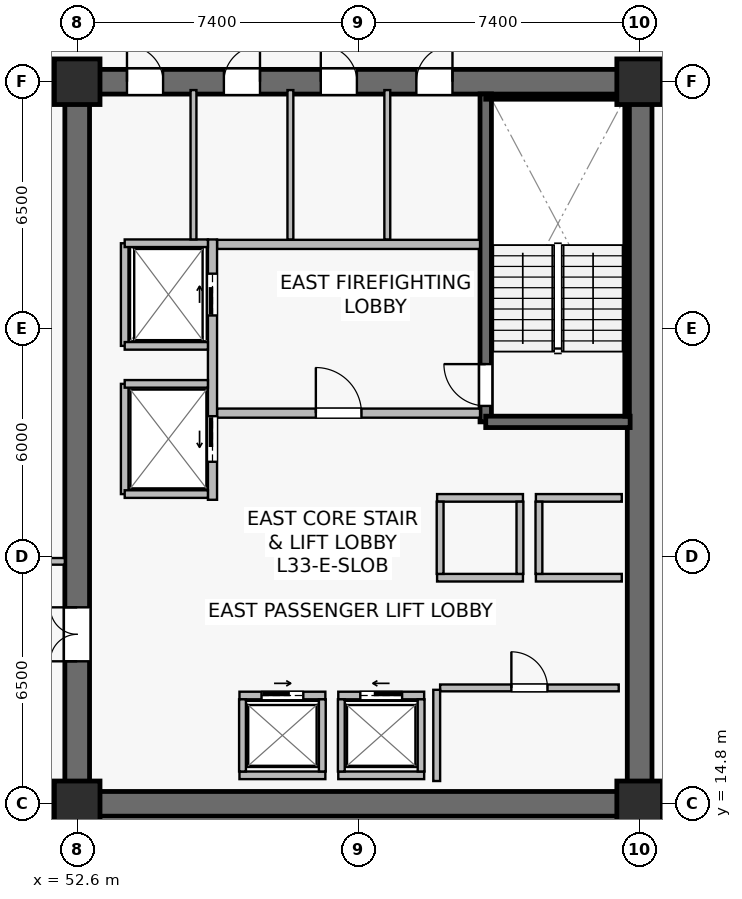
"""IFC4 building model, lengths in metres.
Left out: names, types, materials, properties, quantities, classifications, styles, units other than length and angle.
Written with IfcOpenShell. Run it as: python <this file> out.ifc"""

import sys

from ifc_helpers import new_model, si_unit, direction, frame, frame_2d, origin, origin_2d, place, context, subcontext, project, spatial, rectangle, extrude, source, transform, mapped, element, fill, save


model = new_model("IFC4")
c1 = context("Model", 3, precision=1e-05, world=origin(), true_north=direction((0.0, 1.0)))
c2 = subcontext(c1, "Body", "Model", "MODEL_VIEW")
j1 = project(units=[si_unit("LENGTHUNIT", "METRE"), si_unit("PLANEANGLEUNIT", "RADIAN")], contexts=[c1])
p1 = place(None, origin())
s1 = spatial("IfcSite", under=j1, at=p1, CompositionType="ELEMENT")
p2 = place(p1, origin())
s2 = spatial("IfcBuilding", under=s1, at=p2, CompositionType="ELEMENT")
p3 = place(p2, frame((0.0, 0.0, 137.9)))
s3 = spatial("IfcBuildingStorey", under=s2, at=p3, CompositionType="ELEMENT", Elevation=137.9)
p4 = place(p3, frame((52.275, 14.8, 0.0), z_axis=(0.0, 0.0, 1.0), x_axis=(1.0, 0.0, 0.0)))
e1 = element("IfcWall", 1, at=p4, inside=s3, PredefinedType="SHEAR", context=c2, shape_type="SweptSolid", body=[
    extrude(rectangle(XDim=15.45, YDim=0.65, at=frame_2d((7.725, 0.0))), origin(), (0.0, 0.0, 1.0), 3.79),
])
p5 = place(p3, frame((52.275, 33.8, 0.0), z_axis=(0.0, 0.0, 1.0), x_axis=(1.0, 0.0, 0.0)))
e2 = element("IfcWall", 2, at=p5, inside=s3, PredefinedType="SHEAR", context=c2, shape_type="SweptSolid", body=[
    extrude(rectangle(XDim=15.45, YDim=0.65, at=frame_2d((7.725, 0.0))), origin(), (0.0, 0.0, 1.0), 3.79),
])
p6 = place(p5, frame((9.25, 0.0, 0.0)))
e3 = element("IfcOpeningElement", 3, at=p6, cuts=e2, PredefinedType="OPENING", context=c2, shape_type="SweptSolid", body=[
    extrude(rectangle(XDim=0.95, YDim=2.15, at=frame_2d((0.475, 1.075))), frame((0.0, 0.335, 0.0), z_axis=(0.0, -1.0, 0.0), x_axis=(1.0, 0.0, 0.0)), (0.0, 0.0, 1.0), 0.67),
])
p7 = place(p5, frame((6.735, 0.0, 0.0)))
e4 = element("IfcOpeningElement", 4, at=p7, cuts=e2, PredefinedType="OPENING", context=c2, shape_type="SweptSolid", body=[
    extrude(rectangle(XDim=0.95, YDim=2.15, at=frame_2d((0.475, 1.075))), frame((0.0, 0.335, 0.0), z_axis=(0.0, -1.0, 0.0), x_axis=(1.0, 0.0, 0.0)), (0.0, 0.0, 1.0), 0.67),
])
p8 = place(p5, frame((4.185, 0.0, 0.0)))
e5 = element("IfcOpeningElement", 5, at=p8, cuts=e2, PredefinedType="OPENING", context=c2, shape_type="SweptSolid", body=[
    extrude(rectangle(XDim=0.95, YDim=2.15, at=frame_2d((0.475, 1.075))), frame((0.0, 0.335, 0.0), z_axis=(0.0, -1.0, 0.0), x_axis=(1.0, 0.0, 0.0)), (0.0, 0.0, 1.0), 0.67),
])
p9 = place(p5, frame((1.635, 0.0, 0.0)))
e6 = element("IfcOpeningElement", 6, at=p9, cuts=e2, PredefinedType="OPENING", context=c2, shape_type="SweptSolid", body=[
    extrude(rectangle(XDim=0.95, YDim=2.15, at=frame_2d((0.475, 1.075))), frame((0.0, 0.335, 0.0), z_axis=(0.0, -1.0, 0.0), x_axis=(1.0, 0.0, 0.0)), (0.0, 0.0, 1.0), 0.67),
])
p10 = place(p3, frame((52.6, 15.125, 0.0), z_axis=(0.0, 0.0, 1.0), x_axis=(0.0, 1.0, 0.0)))
e7 = element("IfcWall", 7, at=p10, inside=s3, PredefinedType="SHEAR", context=c2, shape_type="SweptSolid", body=[
    extrude(rectangle(XDim=18.35, YDim=0.65, at=frame_2d((9.175, 0.0))), origin(), (0.0, 0.0, 1.0), 3.79),
])
p11 = place(p10, frame((3.425, 0.0, 0.0)))
e8 = element("IfcOpeningElement", 8, at=p11, cuts=e7, PredefinedType="OPENING", context=c2, shape_type="SweptSolid", body=[
    extrude(rectangle(XDim=1.42, YDim=2.2, at=frame_2d((0.71, 1.1))), frame((0.0, 0.335, 0.0), z_axis=(0.0, -1.0, 0.0), x_axis=(1.0, 0.0, 0.0)), (0.0, 0.0, 1.0), 0.67),
])
p12 = place(p3, frame((67.4, 15.125, 0.0), z_axis=(0.0, 0.0, 1.0), x_axis=(0.0, 1.0, 0.0)))
e9 = element("IfcWall", 9, at=p12, inside=s3, PredefinedType="SHEAR", context=c2, shape_type="SweptSolid", body=[
    extrude(rectangle(XDim=18.35, YDim=0.65, at=frame_2d((9.175, 0.0))), origin(), (0.0, 0.0, 1.0), 3.79),
])
p13 = place(p3, frame((63.35, 24.85, 0.0), z_axis=(0.0, 0.0, 1.0), x_axis=(0.0, 1.0, 0.0)))
e10 = element("IfcWall", 10, at=p13, inside=s3, PredefinedType="SHEAR", context=c2, shape_type="SweptSolid", body=[
    extrude(rectangle(XDim=8.63, YDim=0.3, at=frame_2d((4.315, 0.0))), origin(), (0.0, 0.0, 1.0), 3.79),
])
p14 = place(p13, frame((0.42, 0.0, 0.0)))
e11 = element("IfcOpeningElement", 11, at=p14, cuts=e10, PredefinedType="OPENING", context=c2, shape_type="SweptSolid", body=[
    extrude(rectangle(XDim=1.1, YDim=2.15, at=frame_2d((0.55, 1.075))), frame((0.0, 0.16, 0.0), z_axis=(0.0, -1.0, 0.0), x_axis=(1.0, 0.0, 0.0)), (0.0, 0.0, 1.0), 0.32),
])
p15 = place(p3, frame((63.35, 24.85, 0.0), z_axis=(0.0, 0.0, 1.0), x_axis=(1.0, 0.0, 0.0)))
e12 = element("IfcWall", 12, at=p15, inside=s3, PredefinedType="SHEAR", context=c2, shape_type="SweptSolid", body=[
    extrude(rectangle(XDim=3.8, YDim=0.3, at=frame_2d((1.9, 0.0))), origin(), (0.0, 0.0, 1.0), 3.79),
])
p16 = place(p3, frame((63.35, 33.4, 0.0), z_axis=(0.0, 0.0, 1.0), x_axis=(1.0, 0.0, 0.0)))
e13 = element("IfcWall", 13, at=p16, inside=s3, PredefinedType="SOLIDWALL", context=c2, shape_type="SweptSolid", body=[
    extrude(rectangle(XDim=3.72, YDim=0.12, at=frame_2d((1.86, 0.0))), origin(), (0.0, 0.0, 1.0), 3.79),
])
p17 = place(p3, frame((67.07, 25.0, 0.0), z_axis=(0.0, 0.0, 1.0), x_axis=(0.0, 1.0, 0.0)))
e14 = element("IfcWall", 14, at=p17, inside=s3, PredefinedType="SOLIDWALL", context=c2, shape_type="SweptSolid", body=[
    extrude(rectangle(XDim=8.32, YDim=0.12, at=frame_2d((4.16, 0.0))), origin(), (0.0, 0.0, 1.0), 3.79),
])
m1 = source(origin(), c2, "Body", "SweptSolid", [
    extrude(rectangle(XDim=1.2, YDim=1.2, at=origin_2d()), origin(), (0.0, 0.0, 1.0), 4.1),
])
for number, where, z_axis, x_axis in (
    (15, (52.6, 14.8, 0.0), (0.0, 0.0, 1.0), (1.0, 0.0, 0.0)),
    (16, (67.4, 14.8, 0.0), (0.0, 0.0, 1.0), (1.0, 0.0, 0.0)),
    (17, (52.6, 33.8, 0.0), (0.0, 0.0, 1.0), (1.0, 0.0, 0.0)),
    (18, (67.4, 33.8, 0.0), (0.0, 0.0, 1.0), (1.0, 0.0, 0.0)),
):
    element("IfcColumn", number, at=place(p3, frame(where, z_axis=z_axis, x_axis=x_axis)), inside=s3, PredefinedType="COLUMN", context=c2, shape_type="MappedRepresentation", body=[
        mapped(m1, transform((0.0, 0.0, 0.0), scale=1.0)),
    ])
p18 = place(p3, frame((56.28, 25.08, 0.0), z_axis=(0.0, 0.0, 1.0), x_axis=(1.0, 0.0, 0.0)))
e19 = element("IfcWall", 19, at=p18, inside=s3, PredefinedType="SOLIDWALL", context=c2, shape_type="SweptSolid", body=[
    extrude(rectangle(XDim=6.92, YDim=0.24, at=frame_2d((3.46, 0.0))), origin(), (0.0, 0.0, 1.0), 3.125),
])
p19 = place(p18, frame((2.6, 0.0, 0.0)))
e20 = element("IfcOpeningElement", 20, at=p19, cuts=e19, PredefinedType="OPENING", context=c2, shape_type="SweptSolid", body=[
    extrude(rectangle(XDim=1.2, YDim=2.16, at=frame_2d((0.6, 1.08))), frame((0.0, 0.13, 0.0), z_axis=(0.0, -1.0, 0.0), x_axis=(1.0, 0.0, 0.0)), (0.0, 0.0, 1.0), 0.26),
])
p20 = place(p3, frame((56.28, 29.52, 0.0), z_axis=(0.0, 0.0, 1.0), x_axis=(1.0, 0.0, 0.0)))
e21 = element("IfcWall", 21, at=p20, inside=s3, PredefinedType="SOLIDWALL", context=c2, shape_type="SweptSolid", body=[
    extrude(rectangle(XDim=6.92, YDim=0.24, at=frame_2d((3.46, 0.0))), origin(), (0.0, 0.0, 1.0), 3.125),
])
p21 = place(p3, frame((56.16, 22.8, 0.0), z_axis=(0.0, 0.0, 1.0), x_axis=(0.0, 1.0, 0.0)))
e22 = element("IfcWall", 22, at=p21, inside=s3, PredefinedType="SOLIDWALL", context=c2, shape_type="SweptSolid", body=[
    extrude(rectangle(XDim=6.85, YDim=0.24, at=frame_2d((3.425, 0.0))), origin(), (0.0, 0.0, 1.0), 2.875),
])
p22 = place(p21, frame((4.85, 0.0, 0.0)))
e23 = element("IfcOpeningElement", 23, at=p22, cuts=e22, PredefinedType="OPENING", context=c2, shape_type="SweptSolid", body=[
    extrude(rectangle(XDim=1.1, YDim=2.22, at=frame_2d((0.55, 1.11))), frame((0.0, 0.13, 0.0), z_axis=(0.0, -1.0, 0.0), x_axis=(1.0, 0.0, 0.0)), (0.0, 0.0, 1.0), 0.26),
])
p23 = place(p21, frame((1.0, 0.0, 0.0)))
e24 = element("IfcOpeningElement", 24, at=p23, cuts=e22, PredefinedType="OPENING", context=c2, shape_type="SweptSolid", body=[
    extrude(rectangle(XDim=1.2, YDim=2.22, at=frame_2d((0.6, 1.11))), frame((0.0, 0.13, 0.0), z_axis=(0.0, -1.0, 0.0), x_axis=(1.0, 0.0, 0.0)), (0.0, 0.0, 1.0), 0.26),
])
p24 = place(p3, frame((59.47, 17.65, 0.0), z_axis=(0.0, 0.0, 1.0), x_axis=(1.0, 0.0, 0.0)))
e25 = element("IfcWall", 25, at=p24, inside=s3, PredefinedType="SOLIDWALL", context=c2, shape_type="SweptSolid", body=[
    extrude(rectangle(XDim=2.26, YDim=0.2, at=frame_2d((1.13, 0.0))), origin(), (0.0, 0.0, 1.0), 3.125),
])
p25 = place(p24, frame((0.58, 0.0, 0.0)))
e26 = element("IfcOpeningElement", 26, at=p25, cuts=e25, PredefinedType="OPENING", context=c2, shape_type="SweptSolid", body=[
    extrude(rectangle(XDim=1.1, YDim=2.22, at=frame_2d((0.55, 1.11))), frame((0.0, 0.11, 0.0), z_axis=(0.0, -1.0, 0.0), x_axis=(1.0, 0.0, 0.0)), (0.0, 0.0, 1.0), 0.22),
])
p26 = place(p3, frame((59.47, 15.55, 0.0), z_axis=(0.0, 0.0, 1.0), x_axis=(1.0, 0.0, 0.0)))
e27 = element("IfcWall", 27, at=p26, inside=s3, PredefinedType="SOLIDWALL", context=c2, shape_type="SweptSolid", body=[
    extrude(rectangle(XDim=2.26, YDim=0.2, at=frame_2d((1.13, 0.0))), origin(), (0.0, 0.0, 1.0), 3.125),
])
for number, where, z_axis, x_axis in (
    (28, (59.55, 15.65, 0.0), (0.0, 0.0, 1.0), (0.0, 1.0, 0.0)),
    (29, (61.65, 15.65, 0.0), (0.0, 0.0, 1.0), (0.0, 1.0, 0.0)),
):
    element("IfcWall", number, at=place(p3, frame(where, z_axis=z_axis, x_axis=x_axis)), inside=s3, PredefinedType="SOLIDWALL", context=c2, shape_type="SweptSolid", body=[
        extrude(rectangle(XDim=1.9, YDim=0.18, at=frame_2d((0.95, 0.0))), origin(), (0.0, 0.0, 1.0), 3.79),
    ])
p27 = place(p3, frame((56.87, 17.65, 0.0), z_axis=(0.0, 0.0, 1.0), x_axis=(1.0, 0.0, 0.0)))
e30 = element("IfcWall", 30, at=p27, inside=s3, PredefinedType="SOLIDWALL", context=c2, shape_type="SweptSolid", body=[
    extrude(rectangle(XDim=2.26, YDim=0.2, at=frame_2d((1.13, 0.0))), origin(), (0.0, 0.0, 1.0), 3.79),
])
p28 = place(p27, frame((0.58, 0.0, 0.0)))
e31 = element("IfcOpeningElement", 31, at=p28, cuts=e30, PredefinedType="OPENING", context=c2, shape_type="SweptSolid", body=[
    extrude(rectangle(XDim=1.1, YDim=2.22, at=frame_2d((0.55, 1.11))), frame((0.0, 0.11, 0.0), z_axis=(0.0, -1.0, 0.0), x_axis=(1.0, 0.0, 0.0)), (0.0, 0.0, 1.0), 0.22),
])
p29 = place(p3, frame((56.87, 15.55, 0.0), z_axis=(0.0, 0.0, 1.0), x_axis=(1.0, 0.0, 0.0)))
e32 = element("IfcWall", 32, at=p29, inside=s3, PredefinedType="SOLIDWALL", context=c2, shape_type="SweptSolid", body=[
    extrude(rectangle(XDim=2.26, YDim=0.2, at=frame_2d((1.13, 0.0))), origin(), (0.0, 0.0, 1.0), 3.79),
])
for number, where, z_axis, x_axis in (
    (33, (56.95, 15.65, 0.0), (0.0, 0.0, 1.0), (0.0, 1.0, 0.0)),
    (34, (59.05, 15.65, 0.0), (0.0, 0.0, 1.0), (0.0, 1.0, 0.0)),
):
    element("IfcWall", number, at=place(p3, frame(where, z_axis=z_axis, x_axis=x_axis)), inside=s3, PredefinedType="SOLIDWALL", context=c2, shape_type="SweptSolid", body=[
        extrude(rectangle(XDim=1.9, YDim=0.18, at=frame_2d((0.95, 0.0))), origin(), (0.0, 0.0, 1.0), 3.79),
    ])
for number, where, z_axis, x_axis in (
    (35, (64.67, 20.75, 0.0), (0.0, 0.0, 1.0), (1.0, 0.0, 0.0)),
    (36, (64.67, 22.85, 0.0), (0.0, 0.0, 1.0), (1.0, 0.0, 0.0)),
):
    element("IfcWall", number, at=place(p3, frame(where, z_axis=z_axis, x_axis=x_axis)), inside=s3, PredefinedType="SOLIDWALL", context=c2, shape_type="SweptSolid", body=[
        extrude(rectangle(XDim=2.26, YDim=0.2, at=frame_2d((1.13, 0.0))), origin(), (0.0, 0.0, 1.0), 3.79),
    ])
p30 = place(p3, frame((64.75, 20.85, 0.0), z_axis=(0.0, 0.0, 1.0), x_axis=(0.0, 1.0, 0.0)))
e37 = element("IfcWall", 37, at=p30, inside=s3, PredefinedType="SOLIDWALL", context=c2, shape_type="SweptSolid", body=[
    extrude(rectangle(XDim=1.9, YDim=0.18, at=frame_2d((0.95, 0.0))), origin(), (0.0, 0.0, 1.0), 3.79),
])
for number, where, z_axis, x_axis in (
    (38, (62.07, 20.75, 0.0), (0.0, 0.0, 1.0), (1.0, 0.0, 0.0)),
    (39, (62.07, 22.85, 0.0), (0.0, 0.0, 1.0), (1.0, 0.0, 0.0)),
):
    element("IfcWall", number, at=place(p3, frame(where, z_axis=z_axis, x_axis=x_axis)), inside=s3, PredefinedType="SOLIDWALL", context=c2, shape_type="SweptSolid", body=[
        extrude(rectangle(XDim=2.26, YDim=0.2, at=frame_2d((1.13, 0.0))), origin(), (0.0, 0.0, 1.0), 3.79),
    ])
for number, where, z_axis, x_axis in (
    (40, (62.15, 20.85, 0.0), (0.0, 0.0, 1.0), (0.0, 1.0, 0.0)),
    (41, (64.25, 20.85, 0.0), (0.0, 0.0, 1.0), (0.0, 1.0, 0.0)),
):
    element("IfcWall", number, at=place(p3, frame(where, z_axis=z_axis, x_axis=x_axis)), inside=s3, PredefinedType="SOLIDWALL", context=c2, shape_type="SweptSolid", body=[
        extrude(rectangle(XDim=1.9, YDim=0.18, at=frame_2d((0.95, 0.0))), origin(), (0.0, 0.0, 1.0), 3.79),
    ])
p31 = place(p3, frame((53.85, 26.85, 0.0), z_axis=(0.0, 0.0, 1.0), x_axis=(0.0, 1.0, 0.0)))
e42 = element("IfcWall", 42, at=p31, inside=s3, PredefinedType="SOLIDWALL", context=c2, shape_type="SweptSolid", body=[
    extrude(rectangle(XDim=2.7, YDim=0.2, at=frame_2d((1.35, 0.0))), origin(), (0.0, 0.0, 1.0), 3.79),
])
p32 = place(p3, frame((53.85, 29.55, 0.0), z_axis=(0.0, 0.0, 1.0), x_axis=(1.0, 0.0, 0.0)))
e43 = element("IfcWall", 43, at=p32, inside=s3, PredefinedType="SOLIDWALL", context=c2, shape_type="SweptSolid", body=[
    extrude(rectangle(XDim=2.19, YDim=0.2, at=frame_2d((1.095, 0.0))), origin(), (0.0, 0.0, 1.0), 3.79),
])
p33 = place(p3, frame((53.85, 26.85, 0.0), z_axis=(0.0, 0.0, 1.0), x_axis=(1.0, 0.0, 0.0)))
e44 = element("IfcWall", 44, at=p33, inside=s3, PredefinedType="SOLIDWALL", context=c2, shape_type="SweptSolid", body=[
    extrude(rectangle(XDim=2.19, YDim=0.2, at=frame_2d((1.095, 0.0))), origin(), (0.0, 0.0, 1.0), 3.187),
])
p34 = place(p3, frame((53.85, 22.95, 0.0), z_axis=(0.0, 0.0, 1.0), x_axis=(0.0, 1.0, 0.0)))
e45 = element("IfcWall", 45, at=p34, inside=s3, PredefinedType="SOLIDWALL", context=c2, shape_type="SweptSolid", body=[
    extrude(rectangle(XDim=2.9, YDim=0.2, at=frame_2d((1.45, 0.0))), origin(), (0.0, 0.0, 1.0), 2.875),
])
for number, where, z_axis, x_axis in (
    (46, (53.85, 25.85, 0.0), (0.0, 0.0, 1.0), (1.0, 0.0, 0.0)),
    (47, (53.85, 22.95, 0.0), (0.0, 0.0, 1.0), (1.0, 0.0, 0.0)),
):
    element("IfcWall", number, at=place(p3, frame(where, z_axis=z_axis, x_axis=x_axis)), inside=s3, PredefinedType="SOLIDWALL", context=c2, shape_type="SweptSolid", body=[
        extrude(rectangle(XDim=2.19, YDim=0.2, at=frame_2d((1.095, 0.0))), origin(), (0.0, 0.0, 1.0), 3.79),
    ])
p35 = place(p3, frame((62.15, 17.85, 0.0), z_axis=(0.0, 0.0, 1.0), x_axis=(1.0, 0.0, 0.0)))
e48 = element("IfcWall", 48, at=p35, inside=s3, PredefinedType="SOLIDWALL", context=c2, shape_type="SweptSolid", body=[
    extrude(rectangle(XDim=4.7, YDim=0.18, at=frame_2d((2.35, 0.0))), origin(), (0.0, 0.0, 1.0), 3.79),
])
p36 = place(p35, frame((1.875, 0.0, 0.0)))
e49 = element("IfcOpeningElement", 49, at=p36, cuts=e48, PredefinedType="OPENING", context=c2, shape_type="SweptSolid", body=[
    extrude(rectangle(XDim=0.95, YDim=2.15, at=frame_2d((0.475, 1.075))), frame((0.0, 0.1, 0.0), z_axis=(0.0, -1.0, 0.0), x_axis=(1.0, 0.0, 0.0)), (0.0, 0.0, 1.0), 0.2),
])
p37 = place(p3, frame((62.06, 15.4, 0.0), z_axis=(0.0, 0.0, 1.0), x_axis=(0.0, 1.0, 0.0)))
e50 = element("IfcWall", 50, at=p37, inside=s3, PredefinedType="SOLIDWALL", context=c2, shape_type="SweptSolid", body=[
    extrude(rectangle(XDim=2.4, YDim=0.18, at=frame_2d((1.2, 0.0))), origin(), (0.0, 0.0, 1.0), 3.79),
])
for number, where, z_axis, x_axis in (
    (51, (60.76, 29.65, 0.0), (0.0, 0.0, 1.0), (0.0, 1.0, 0.0)),
    (52, (58.21, 29.65, 0.0), (0.0, 0.0, 1.0), (0.0, 1.0, 0.0)),
    (53, (55.66, 29.65, 0.0), (0.0, 0.0, 1.0), (0.0, 1.0, 0.0)),
):
    element("IfcWall", number, at=place(p3, frame(where, z_axis=z_axis, x_axis=x_axis)), inside=s3, PredefinedType="PLUMBINGWALL", context=c2, shape_type="SweptSolid", body=[
        extrude(rectangle(XDim=3.93, YDim=0.155, at=frame_2d((1.965, 0.0))), origin(), (0.0, 0.0, 1.0), 3.79),
    ])
p38 = place(p3, frame((48.3, 34.26, 0.0), z_axis=(0.0, 0.0, 1.0), x_axis=(1.0, 0.0, 0.0)))
e54 = element("IfcWall", 54, at=p38, inside=s3, PredefinedType="PARTITIONING", context=c2, shape_type="SweptSolid", body=[
    extrude(rectangle(XDim=3.975, YDim=0.175, at=frame_2d((1.987, 0.0))), origin(), (0.0, 0.0, 1.0), 3.475),
])
p39 = place(p3, frame((48.3, 21.18, 0.0), z_axis=(0.0, 0.0, 1.0), x_axis=(1.0, 0.0, 0.0)))
e55 = element("IfcWall", 55, at=p39, inside=s3, PredefinedType="PARTITIONING", context=c2, shape_type="SweptSolid", body=[
    extrude(rectangle(XDim=3.975, YDim=0.175, at=frame_2d((1.987, 0.0))), origin(), (0.0, 0.0, 1.0), 3.79),
])
p40 = place(p39, frame((1.35, 0.0, 0.0)))
e56 = element("IfcOpeningElement", 56, at=p40, cuts=e55, PredefinedType="OPENING", context=c2, shape_type="SweptSolid", body=[
    extrude(rectangle(XDim=0.95, YDim=2.15, at=frame_2d((0.475, 1.075))), frame((0.0, 0.098, 0.0), z_axis=(0.0, -1.0, 0.0), x_axis=(1.0, 0.0, 0.0)), (0.0, 0.0, 1.0), 0.195),
])
m2 = source(origin(), c2, "Body", "SweptSolid", [
    extrude(rectangle(XDim=1.1, YDim=2.15, at=frame_2d((0.55, 1.075))), frame((0.0, 0.025, 0.0), z_axis=(0.0, -1.0, 0.0), x_axis=(1.0, 0.0, 0.0)), (0.0, 0.0, 1.0), 0.05),
])
p41 = place(p14, origin())
e57 = element("IfcDoor", 57, at=p41, inside=s3, OperationType="SINGLE_SWING_RIGHT", PredefinedType="DOOR", context=c2, shape_type="MappedRepresentation", body=[
    mapped(m2, transform((0.0, 0.0, 0.0), scale=1.0)),
])
fill(e11, e57)
m3 = source(origin(), c2, "Body", "SweptSolid", [
    extrude(rectangle(XDim=1.2, YDim=2.16, at=frame_2d((0.6, 1.08))), frame((0.0, 0.025, 0.0), z_axis=(0.0, -1.0, 0.0), x_axis=(1.0, 0.0, 0.0)), (0.0, 0.0, 1.0), 0.05),
])
p42 = place(p19, origin())
e58 = element("IfcDoor", 58, at=p42, inside=s3, OperationType="SINGLE_SWING_LEFT", PredefinedType="DOOR", context=c2, shape_type="MappedRepresentation", body=[
    mapped(m3, transform((0.0, 0.0, 0.0), scale=1.0)),
])
fill(e20, e58)
m4 = source(origin(), c2, "Body", "SweptSolid", [
    extrude(rectangle(XDim=1.1, YDim=2.22, at=frame_2d((0.55, 1.11))), frame((0.0, 0.025, 0.0), z_axis=(0.0, -1.0, 0.0), x_axis=(1.0, 0.0, 0.0)), (0.0, 0.0, 1.0), 0.05),
])
p43 = place(p25, origin())
e59 = element("IfcDoor", 59, at=p43, inside=s3, OperationType="SLIDING_TO_LEFT", PredefinedType="USERDEFINED", context=c2, shape_type="MappedRepresentation", body=[
    mapped(m4, transform((0.0, 0.0, 0.0), scale=1.0)),
])
fill(e26, e59)
p44 = place(p28, origin())
e60 = element("IfcDoor", 60, at=p44, inside=s3, OperationType="SLIDING_TO_RIGHT", PredefinedType="USERDEFINED", context=c2, shape_type="MappedRepresentation", body=[
    mapped(m4, transform((0.0, 0.0, 0.0), scale=1.0)),
])
fill(e31, e60)
p45 = place(p22, origin())
e61 = element("IfcDoor", 61, at=p45, inside=s3, OperationType="SLIDING_TO_RIGHT", PredefinedType="USERDEFINED", context=c2, shape_type="MappedRepresentation", body=[
    mapped(m4, transform((0.0, 0.0, 0.0), scale=1.0)),
])
fill(e23, e61)
m5 = source(origin(), c2, "Body", "SweptSolid", [
    extrude(rectangle(XDim=1.2, YDim=2.22, at=frame_2d((0.6, 1.11))), frame((0.0, 0.025, 0.0), z_axis=(0.0, -1.0, 0.0), x_axis=(1.0, 0.0, 0.0)), (0.0, 0.0, 1.0), 0.05),
])
p46 = place(p23, origin())
e62 = element("IfcDoor", 62, at=p46, inside=s3, OperationType="SLIDING_TO_LEFT", PredefinedType="USERDEFINED", context=c2, shape_type="MappedRepresentation", body=[
    mapped(m5, transform((0.0, 0.0, 0.0), scale=1.0)),
])
fill(e24, e62)
m6 = source(origin(), c2, "Body", "SweptSolid", [
    extrude(rectangle(XDim=0.95, YDim=2.15, at=frame_2d((0.475, 1.075))), frame((0.0, 0.025, 0.0), z_axis=(0.0, -1.0, 0.0), x_axis=(1.0, 0.0, 0.0)), (0.0, 0.0, 1.0), 0.05),
])
p47 = place(p36, origin())
e63 = element("IfcDoor", 63, at=p47, inside=s3, OperationType="SINGLE_SWING_LEFT", PredefinedType="DOOR", context=c2, shape_type="MappedRepresentation", body=[
    mapped(m6, transform((0.0, 0.0, 0.0), scale=1.0)),
])
fill(e49, e63)
m7 = source(origin(), c2, "Body", "SweptSolid", [
    extrude(rectangle(XDim=1.42, YDim=2.2, at=frame_2d((0.71, 1.1))), frame((0.0, 0.025, 0.0), z_axis=(0.0, -1.0, 0.0), x_axis=(1.0, 0.0, 0.0)), (0.0, 0.0, 1.0), 0.05),
])
p48 = place(p11, origin())
e64 = element("IfcDoor", 64, at=p48, inside=s3, OperationType="DOUBLE_DOOR_SINGLE_SWING", PredefinedType="DOOR", context=c2, shape_type="MappedRepresentation", body=[
    mapped(m7, transform((0.0, 0.0, 0.0), scale=1.0)),
])
fill(e8, e64)
p49 = place(p6, origin())
e65 = element("IfcDoor", 65, at=p49, inside=s3, OperationType="SINGLE_SWING_RIGHT", PredefinedType="DOOR", context=c2, shape_type="MappedRepresentation", body=[
    mapped(m6, transform((0.0, 0.0, 0.0), scale=1.0)),
])
fill(e3, e65)
p50 = place(p7, origin())
e66 = element("IfcDoor", 66, at=p50, inside=s3, OperationType="SINGLE_SWING_LEFT", PredefinedType="DOOR", context=c2, shape_type="MappedRepresentation", body=[
    mapped(m6, transform((0.0, 0.0, 0.0), scale=1.0)),
])
fill(e4, e66)
p51 = place(p8, origin())
e67 = element("IfcDoor", 67, at=p51, inside=s3, OperationType="SINGLE_SWING_RIGHT", PredefinedType="DOOR", context=c2, shape_type="MappedRepresentation", body=[
    mapped(m6, transform((0.0, 0.0, 0.0), scale=1.0)),
])
fill(e5, e67)
p52 = place(p9, origin())
e68 = element("IfcDoor", 68, at=p52, inside=s3, OperationType="SINGLE_SWING_LEFT", PredefinedType="DOOR", context=c2, shape_type="MappedRepresentation", body=[
    mapped(m6, transform((0.0, 0.0, 0.0), scale=1.0)),
])
fill(e6, e68)
save(model, sys.argv[1])
